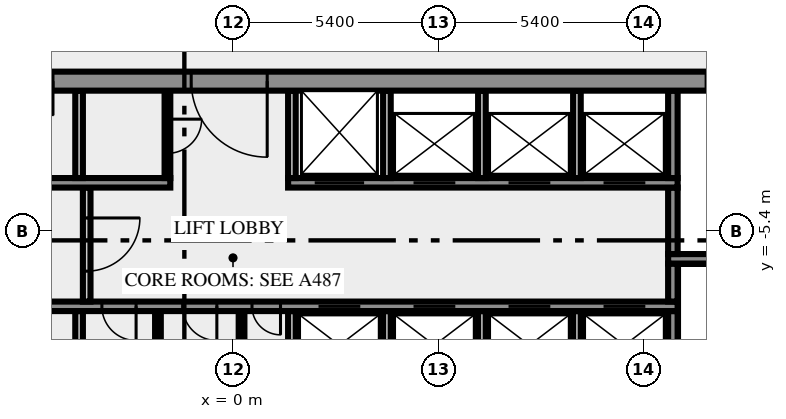
"""IFC4 building model, lengths in metres.
Left out: names, types, materials, properties, quantities, classifications, styles, units other than length and angle.
Written with IfcOpenShell. Run it as: python <this file> out.ifc"""

import sys

from ifc_helpers import new_model, si_unit, direction, frame, frame_2d, origin, place, context, subcontext, project, spatial, rectangle, extrude, element, fill, save


model = new_model("IFC4")
c1 = context("Model", 3, precision=1e-05, world=origin(), true_north=direction((0.0, 1.0)))
c2 = subcontext(c1, "Body", "Model", "MODEL_VIEW")
j1 = project(units=[si_unit("LENGTHUNIT", "METRE"), si_unit("PLANEANGLEUNIT", "RADIAN")], contexts=[c1])
p1 = place(None, origin())
s1 = spatial("IfcSite", under=j1, at=p1, CompositionType="ELEMENT")
p2 = place(p1, origin())
s2 = spatial("IfcBuilding", under=s1, at=p2, CompositionType="ELEMENT")
p3 = place(p2, frame((0.0, 0.0, 180.0)))
s3 = spatial("IfcBuildingStorey", under=s2, at=p3, CompositionType="ELEMENT", Elevation=180.0)
p4 = place(p3, frame((-4.05, -10.5, 0.0), z_axis=(0.0, 0.0, 1.0), x_axis=(0.0, 1.0, 0.0)))
e1 = element("IfcWall", 1, at=p4, inside=s3, PredefinedType="SOLIDWALL", context=c2, shape_type="SweptSolid", body=[
    extrude(rectangle(XDim=3.0, YDim=0.2, at=frame_2d((1.5, 0.0))), origin(), (0.0, 0.0, 1.0), 3.65),
])
for number, where, z_axis, x_axis in (
    (2, (-1.975, -10.5, 0.0), (0.0, 0.0, 1.0), (0.0, 1.0, 0.0)),
    (3, (0.225, -10.5, 0.0), (0.0, 0.0, 1.0), (0.0, 1.0, 0.0)),
):
    element("IfcWall", number, at=place(p3, frame(where, z_axis=z_axis, x_axis=x_axis)), inside=s3, PredefinedType="PARTITIONING", context=c2, shape_type="SweptSolid", body=[
        extrude(rectangle(XDim=3.0, YDim=0.15, at=frame_2d((1.5, 0.0))), origin(), (0.0, 0.0, 1.0), 3.65),
    ])
for number, where, z_axis, x_axis in (
    (4, (1.55, -10.5, 0.0), (0.0, 0.0, 1.0), (0.0, 1.0, 0.0)),
    (5, (4.05, -10.5, 0.0), (0.0, 0.0, 1.0), (0.0, 1.0, 0.0)),
    (6, (6.55, -10.5, 0.0), (0.0, 0.0, 1.0), (0.0, 1.0, 0.0)),
    (7, (9.05, -10.5, 0.0), (0.0, 0.0, 1.0), (0.0, 1.0, 0.0)),
):
    element("IfcWall", number, at=place(p3, frame(where, z_axis=z_axis, x_axis=x_axis)), inside=s3, PredefinedType="SOLIDWALL", context=c2, shape_type="SweptSolid", body=[
        extrude(rectangle(XDim=3.0, YDim=0.2, at=frame_2d((1.5, 0.0))), origin(), (0.0, 0.0, 1.0), 3.65),
    ])
p5 = place(p3, frame((11.575, -10.5, 0.0), z_axis=(0.0, 0.0, 1.0), x_axis=(0.0, 1.0, 0.0)))
e8 = element("IfcWall", 8, at=p5, inside=s3, PredefinedType="SHEAR", context=c2, shape_type="SweptSolid", body=[
    extrude(rectangle(XDim=3.0, YDim=0.25, at=frame_2d((1.5, 0.0))), origin(), (0.0, 0.0, 1.0), 3.65),
])
p6 = place(p3, frame((11.7, -7.375, 0.0), z_axis=(0.0, 0.0, 1.0), x_axis=(-1.0, 0.0, 0.0)))
e9 = element("IfcWall", 9, at=p6, inside=s3, PredefinedType="SHEAR", context=c2, shape_type="SweptSolid", body=[
    extrude(rectangle(XDim=23.4, YDim=0.25, at=frame_2d((11.7, 0.0))), origin(), (0.0, 0.0, 1.0), 3.65),
])
p7 = place(p6, frame((20.613, 0.0, 0.0)))
e10 = element("IfcOpeningElement", 10, at=p7, cuts=e9, PredefinedType="OPENING", context=c2, shape_type="SweptSolid", body=[
    extrude(rectangle(XDim=0.9, YDim=2.1, at=frame_2d((0.45, 1.05))), frame((0.0, 0.135, 0.0), z_axis=(0.0, -1.0, 0.0), x_axis=(1.0, 0.0, 0.0)), (0.0, 0.0, 1.0), 0.27),
])
p8 = place(p6, frame((16.888, 0.0, 0.0)))
e11 = element("IfcOpeningElement", 11, at=p8, cuts=e9, PredefinedType="OPENING", context=c2, shape_type="SweptSolid", body=[
    extrude(rectangle(XDim=0.9, YDim=2.1, at=frame_2d((0.45, 1.05))), frame((0.0, 0.135, 0.0), z_axis=(0.0, -1.0, 0.0), x_axis=(1.0, 0.0, 0.0)), (0.0, 0.0, 1.0), 0.27),
])
p9 = place(p6, frame((14.25, 0.0, 0.0)))
e12 = element("IfcOpeningElement", 12, at=p9, cuts=e9, PredefinedType="OPENING", context=c2, shape_type="SweptSolid", body=[
    extrude(rectangle(XDim=0.9, YDim=2.1, at=frame_2d((0.45, 1.05))), frame((0.0, 0.135, 0.0), z_axis=(0.0, -1.0, 0.0), x_axis=(1.0, 0.0, 0.0)), (0.0, 0.0, 1.0), 0.27),
])
p10 = place(p6, frame((12.125, 0.0, 0.0)))
e13 = element("IfcOpeningElement", 13, at=p10, cuts=e9, PredefinedType="OPENING", context=c2, shape_type="SweptSolid", body=[
    extrude(rectangle(XDim=0.9, YDim=2.1, at=frame_2d((0.45, 1.05))), frame((0.0, 0.135, 0.0), z_axis=(0.0, -1.0, 0.0), x_axis=(1.0, 0.0, 0.0)), (0.0, 0.0, 1.0), 0.27),
])
p11 = place(p6, frame((10.45, 0.0, 0.0)))
e14 = element("IfcOpeningElement", 14, at=p11, cuts=e9, PredefinedType="OPENING", context=c2, shape_type="SweptSolid", body=[
    extrude(rectangle(XDim=0.75, YDim=2.1, at=frame_2d((0.375, 1.05))), frame((0.0, 0.135, 0.0), z_axis=(0.0, -1.0, 0.0), x_axis=(1.0, 0.0, 0.0)), (0.0, 0.0, 1.0), 0.27),
])
p12 = place(p6, frame((8.35, 0.0, 0.0)))
e15 = element("IfcOpeningElement", 15, at=p12, cuts=e9, PredefinedType="OPENING", context=c2, shape_type="SweptSolid", body=[
    extrude(rectangle(XDim=1.1, YDim=2.1, at=frame_2d((0.55, 1.05))), frame((0.0, 0.135, 0.0), z_axis=(0.0, -1.0, 0.0), x_axis=(1.0, 0.0, 0.0)), (0.0, 0.0, 1.0), 0.27),
])
p13 = place(p6, frame((5.85, 0.0, 0.0)))
e16 = element("IfcOpeningElement", 16, at=p13, cuts=e9, PredefinedType="OPENING", context=c2, shape_type="SweptSolid", body=[
    extrude(rectangle(XDim=1.1, YDim=2.1, at=frame_2d((0.55, 1.05))), frame((0.0, 0.135, 0.0), z_axis=(0.0, -1.0, 0.0), x_axis=(1.0, 0.0, 0.0)), (0.0, 0.0, 1.0), 0.27),
])
p14 = place(p6, frame((3.35, 0.0, 0.0)))
e17 = element("IfcOpeningElement", 17, at=p14, cuts=e9, PredefinedType="OPENING", context=c2, shape_type="SweptSolid", body=[
    extrude(rectangle(XDim=1.1, YDim=2.1, at=frame_2d((0.55, 1.05))), frame((0.0, 0.135, 0.0), z_axis=(0.0, -1.0, 0.0), x_axis=(1.0, 0.0, 0.0)), (0.0, 0.0, 1.0), 0.27),
])
p15 = place(p6, frame((0.85, 0.0, 0.0)))
e18 = element("IfcOpeningElement", 18, at=p15, cuts=e9, PredefinedType="OPENING", context=c2, shape_type="SweptSolid", body=[
    extrude(rectangle(XDim=1.1, YDim=2.1, at=frame_2d((0.55, 1.05))), frame((0.0, 0.135, 0.0), z_axis=(0.0, -1.0, 0.0), x_axis=(1.0, 0.0, 0.0)), (0.0, 0.0, 1.0), 0.27),
])
p16 = place(p3, frame((-3.85, -4.25, 0.0), z_axis=(0.0, 0.0, 1.0), x_axis=(0.0, -1.0, 0.0)))
e19 = element("IfcWall", 19, at=p16, inside=s3, PredefinedType="SOLIDWALL", context=c2, shape_type="SweptSolid", body=[
    extrude(rectangle(XDim=3.0, YDim=0.2, at=frame_2d((1.5, 0.0))), origin(), (0.0, 0.0, 1.0), 3.65),
])
p17 = place(p16, frame((0.8, 0.0, 0.0)))
e20 = element("IfcOpeningElement", 20, at=p17, cuts=e19, PredefinedType="OPENING", context=c2, shape_type="SweptSolid", body=[
    extrude(rectangle(XDim=1.4, YDim=2.1, at=frame_2d((0.7, 1.05))), frame((0.0, 0.11, 0.0), z_axis=(0.0, -1.0, 0.0), x_axis=(1.0, 0.0, 0.0)), (0.0, 0.0, 1.0), 0.22),
])
p18 = place(p3, frame((11.575, -7.25, 0.0), z_axis=(0.0, 0.0, 1.0), x_axis=(0.0, 1.0, 0.0)))
e21 = element("IfcWall", 21, at=p18, inside=s3, PredefinedType="SHEAR", context=c2, shape_type="SweptSolid", body=[
    extrude(rectangle(XDim=1.0, YDim=0.25, at=frame_2d((0.5, 0.0))), origin(), (0.0, 0.0, 1.0), 3.65),
])
p19 = place(p3, frame((19.5, -6.125, 0.0), z_axis=(0.0, 0.0, 1.0), x_axis=(-1.0, 0.0, 0.0)))
e22 = element("IfcWall", 22, at=p19, inside=s3, PredefinedType="SHEAR", context=c2, shape_type="SweptSolid", body=[
    extrude(rectangle(XDim=8.05, YDim=0.25, at=frame_2d((4.025, 0.0))), origin(), (0.0, 0.0, 1.0), 3.65),
])
p20 = place(p19, frame((0.05, 0.0, 0.0)))
e23 = element("IfcOpeningElement", 23, at=p20, cuts=e22, PredefinedType="OPENING", context=c2, shape_type="SweptSolid", body=[
    extrude(rectangle(XDim=1.8, YDim=2.1, at=frame_2d((0.9, 1.05))), frame((0.0, 0.135, 0.0), z_axis=(0.0, -1.0, 0.0), x_axis=(1.0, 0.0, 0.0)), (0.0, 0.0, 1.0), 0.27),
])
p21 = place(p3, frame((11.575, -6.0, 0.0), z_axis=(0.0, 0.0, 1.0), x_axis=(0.0, 1.0, 0.0)))
e24 = element("IfcWall", 24, at=p21, inside=s3, PredefinedType="SHEAR", context=c2, shape_type="SweptSolid", body=[
    extrude(rectangle(XDim=1.75, YDim=0.25, at=frame_2d((0.875, 0.0))), origin(), (0.0, 0.0, 1.0), 3.65),
])
p22 = place(p3, frame((-11.7, -4.125, 0.0), z_axis=(0.0, 0.0, 1.0), x_axis=(1.0, 0.0, 0.0)))
e25 = element("IfcWall", 25, at=p22, inside=s3, PredefinedType="SHEAR", context=c2, shape_type="SweptSolid", body=[
    extrude(rectangle(XDim=10.05, YDim=0.25, at=frame_2d((5.025, 0.0))), origin(), (0.0, 0.0, 1.0), 3.65),
])
p23 = place(p3, frame((1.45, -4.125, 0.0), z_axis=(0.0, 0.0, 1.0), x_axis=(1.0, 0.0, 0.0)))
e26 = element("IfcWall", 26, at=p23, inside=s3, PredefinedType="SHEAR", context=c2, shape_type="SweptSolid", body=[
    extrude(rectangle(XDim=10.25, YDim=0.25, at=frame_2d((5.125, 0.0))), origin(), (0.0, 0.0, 1.0), 3.65),
])
p24 = place(p23, frame((0.7, 0.0, 0.0)))
e27 = element("IfcOpeningElement", 27, at=p24, cuts=e26, PredefinedType="OPENING", context=c2, shape_type="SweptSolid", body=[
    extrude(rectangle(XDim=1.3, YDim=2.1, at=frame_2d((0.65, 1.05))), frame((0.0, 0.135, 0.0), z_axis=(0.0, -1.0, 0.0), x_axis=(1.0, 0.0, 0.0)), (0.0, 0.0, 1.0), 0.27),
])
p25 = place(p23, frame((3.3, 0.0, 0.0)))
e28 = element("IfcOpeningElement", 28, at=p25, cuts=e26, PredefinedType="OPENING", context=c2, shape_type="SweptSolid", body=[
    extrude(rectangle(XDim=1.1, YDim=2.1, at=frame_2d((0.55, 1.05))), frame((0.0, 0.135, 0.0), z_axis=(0.0, -1.0, 0.0), x_axis=(1.0, 0.0, 0.0)), (0.0, 0.0, 1.0), 0.27),
])
p26 = place(p23, frame((5.8, 0.0, 0.0)))
e29 = element("IfcOpeningElement", 29, at=p26, cuts=e26, PredefinedType="OPENING", context=c2, shape_type="SweptSolid", body=[
    extrude(rectangle(XDim=1.1, YDim=2.1, at=frame_2d((0.55, 1.05))), frame((0.0, 0.135, 0.0), z_axis=(0.0, -1.0, 0.0), x_axis=(1.0, 0.0, 0.0)), (0.0, 0.0, 1.0), 0.27),
])
p27 = place(p23, frame((8.3, 0.0, 0.0)))
e30 = element("IfcOpeningElement", 30, at=p27, cuts=e26, PredefinedType="OPENING", context=c2, shape_type="SweptSolid", body=[
    extrude(rectangle(XDim=1.1, YDim=2.1, at=frame_2d((0.55, 1.05))), frame((0.0, 0.135, 0.0), z_axis=(0.0, -1.0, 0.0), x_axis=(1.0, 0.0, 0.0)), (0.0, 0.0, 1.0), 0.27),
])
p28 = place(p3, frame((-4.05, -4.0, 0.0), z_axis=(0.0, 0.0, 1.0), x_axis=(0.0, 1.0, 0.0)))
e31 = element("IfcWall", 31, at=p28, inside=s3, PredefinedType="SOLIDWALL", context=c2, shape_type="SweptSolid", body=[
    extrude(rectangle(XDim=2.3, YDim=0.2, at=frame_2d((1.15, 0.0))), origin(), (0.0, 0.0, 1.0), 3.65),
])
p29 = place(p3, frame((-1.725, -1.7, 0.0), z_axis=(0.0, 0.0, 1.0), x_axis=(0.0, -1.0, 0.0)))
e32 = element("IfcWall", 32, at=p29, inside=s3, PredefinedType="PARTITIONING", context=c2, shape_type="SweptSolid", body=[
    extrude(rectangle(XDim=2.3, YDim=0.15, at=frame_2d((1.15, 0.0))), origin(), (0.0, 0.0, 1.0), 3.65),
])
p30 = place(p29, frame((0.75, 0.0, 0.0)))
e33 = element("IfcOpeningElement", 33, at=p30, cuts=e32, PredefinedType="OPENING", context=c2, shape_type="SweptSolid", body=[
    extrude(rectangle(XDim=0.9, YDim=2.1, at=frame_2d((0.45, 1.05))), frame((0.0, 0.085, 0.0), z_axis=(0.0, -1.0, 0.0), x_axis=(1.0, 0.0, 0.0)), (0.0, 0.0, 1.0), 0.17),
])
for number, where, z_axis, x_axis in (
    (34, (1.55, -4.0, 0.0), (0.0, 0.0, 1.0), (0.0, 1.0, 0.0)),
    (35, (4.05, -4.0, 0.0), (0.0, 0.0, 1.0), (0.0, 1.0, 0.0)),
    (36, (6.55, -4.0, 0.0), (0.0, 0.0, 1.0), (0.0, 1.0, 0.0)),
    (37, (9.05, -4.0, 0.0), (0.0, 0.0, 1.0), (0.0, 1.0, 0.0)),
):
    element("IfcWall", number, at=place(p3, frame(where, z_axis=z_axis, x_axis=x_axis)), inside=s3, PredefinedType="SOLIDWALL", context=c2, shape_type="SweptSolid", body=[
        extrude(rectangle(XDim=2.3, YDim=0.2, at=frame_2d((1.15, 0.0))), origin(), (0.0, 0.0, 1.0), 3.65),
    ])
p31 = place(p3, frame((11.575, -4.0, 0.0), z_axis=(0.0, 0.0, 1.0), x_axis=(0.0, 1.0, 0.0)))
e38 = element("IfcWall", 38, at=p31, inside=s3, PredefinedType="SHEAR", context=c2, shape_type="SweptSolid", body=[
    extrude(rectangle(XDim=2.3, YDim=0.25, at=frame_2d((1.15, 0.0))), origin(), (0.0, 0.0, 1.0), 3.65),
])
p32 = place(p3, frame((20.49, -1.45, 0.0), z_axis=(0.0, 0.0, 1.0), x_axis=(-1.0, 0.0, 0.0)))
e39 = element("IfcWall", 39, at=p32, inside=s3, PredefinedType="SHEAR", context=c2, shape_type="SweptSolid", body=[
    extrude(rectangle(XDim=40.98, YDim=0.5, at=frame_2d((20.49, 0.0))), origin(), (0.0, 0.0, 1.0), 3.65),
])
p33 = place(p32, frame((38.14, 0.0, 0.0)))
e40 = element("IfcOpeningElement", 40, at=p33, cuts=e39, PredefinedType="OPENING", context=c2, shape_type="SweptSolid", body=[
    extrude(rectangle(XDim=1.8, YDim=2.1, at=frame_2d((0.9, 1.05))), frame((0.0, 0.26, 0.0), z_axis=(0.0, -1.0, 0.0), x_axis=(1.0, 0.0, 0.0)), (0.0, 0.0, 1.0), 0.52),
])
p34 = place(p32, frame((35.89, 0.0, 0.0)))
e41 = element("IfcOpeningElement", 41, at=p34, cuts=e39, PredefinedType="OPENING", context=c2, shape_type="SweptSolid", body=[
    extrude(rectangle(XDim=0.9, YDim=2.1, at=frame_2d((0.45, 1.05))), frame((0.0, 0.26, 0.0), z_axis=(0.0, -1.0, 0.0), x_axis=(1.0, 0.0, 0.0)), (0.0, 0.0, 1.0), 0.52),
])
p35 = place(p32, frame((32.94, 0.0, 0.0)))
e42 = element("IfcOpeningElement", 42, at=p35, cuts=e39, PredefinedType="OPENING", context=c2, shape_type="SweptSolid", body=[
    extrude(rectangle(XDim=0.9, YDim=2.1, at=frame_2d((0.45, 1.05))), frame((0.0, 0.26, 0.0), z_axis=(0.0, -1.0, 0.0), x_axis=(1.0, 0.0, 0.0)), (0.0, 0.0, 1.0), 0.52),
])
p36 = place(p32, frame((30.802, 0.0, 0.0)))
e43 = element("IfcOpeningElement", 43, at=p36, cuts=e39, PredefinedType="OPENING", context=c2, shape_type="SweptSolid", body=[
    extrude(rectangle(XDim=0.9, YDim=2.1, at=frame_2d((0.45, 1.05))), frame((0.0, 0.26, 0.0), z_axis=(0.0, -1.0, 0.0), x_axis=(1.0, 0.0, 0.0)), (0.0, 0.0, 1.0), 0.52),
])
p37 = place(p32, frame((29.24, 0.0, 0.0)))
e44 = element("IfcOpeningElement", 44, at=p37, cuts=e39, PredefinedType="OPENING", context=c2, shape_type="SweptSolid", body=[
    extrude(rectangle(XDim=0.9, YDim=2.1, at=frame_2d((0.45, 1.05))), frame((0.0, 0.26, 0.0), z_axis=(0.0, -1.0, 0.0), x_axis=(1.0, 0.0, 0.0)), (0.0, 0.0, 1.0), 0.52),
])
p38 = place(p32, frame((27.39, 0.0, 0.0)))
e45 = element("IfcOpeningElement", 45, at=p38, cuts=e39, PredefinedType="OPENING", context=c2, shape_type="SweptSolid", body=[
    extrude(rectangle(XDim=0.9, YDim=2.1, at=frame_2d((0.45, 1.05))), frame((0.0, 0.26, 0.0), z_axis=(0.0, -1.0, 0.0), x_axis=(1.0, 0.0, 0.0)), (0.0, 0.0, 1.0), 0.52),
])
p39 = place(p32, frame((25.228, 0.0, 0.0)))
e46 = element("IfcOpeningElement", 46, at=p39, cuts=e39, PredefinedType="OPENING", context=c2, shape_type="SweptSolid", body=[
    extrude(rectangle(XDim=0.9, YDim=2.1, at=frame_2d((0.45, 1.05))), frame((0.0, 0.26, 0.0), z_axis=(0.0, -1.0, 0.0), x_axis=(1.0, 0.0, 0.0)), (0.0, 0.0, 1.0), 0.52),
])
p40 = place(p32, frame((19.59, 0.0, 0.0)))
e47 = element("IfcOpeningElement", 47, at=p40, cuts=e39, PredefinedType="OPENING", context=c2, shape_type="SweptSolid", body=[
    extrude(rectangle(XDim=2.0, YDim=2.1, at=frame_2d((1.0, 1.05))), frame((0.0, 0.26, 0.0), z_axis=(0.0, -1.0, 0.0), x_axis=(1.0, 0.0, 0.0)), (0.0, 0.0, 1.0), 0.52),
])
p41 = place(p32, frame((7.14, 0.0, 0.0)))
e48 = element("IfcOpeningElement", 48, at=p41, cuts=e39, PredefinedType="OPENING", context=c2, shape_type="SweptSolid", body=[
    extrude(rectangle(XDim=0.9, YDim=2.1, at=frame_2d((0.45, 1.05))), frame((0.0, 0.26, 0.0), z_axis=(0.0, -1.0, 0.0), x_axis=(1.0, 0.0, 0.0)), (0.0, 0.0, 1.0), 0.52),
])
p42 = place(p32, frame((5.028, 0.0, 0.0)))
e49 = element("IfcOpeningElement", 49, at=p42, cuts=e39, PredefinedType="OPENING", context=c2, shape_type="SweptSolid", body=[
    extrude(rectangle(XDim=0.8, YDim=2.1, at=frame_2d((0.4, 1.05))), frame((0.0, 0.26, 0.0), z_axis=(0.0, -1.0, 0.0), x_axis=(1.0, 0.0, 0.0)), (0.0, 0.0, 1.0), 0.52),
])
p43 = place(p32, frame((3.452, 0.0, 0.0)))
e50 = element("IfcOpeningElement", 50, at=p43, cuts=e39, PredefinedType="OPENING", context=c2, shape_type="SweptSolid", body=[
    extrude(rectangle(XDim=0.8, YDim=2.1, at=frame_2d((0.4, 1.05))), frame((0.0, 0.26, 0.0), z_axis=(0.0, -1.0, 0.0), x_axis=(1.0, 0.0, 0.0)), (0.0, 0.0, 1.0), 0.52),
])
p44 = place(p32, frame((1.04, 0.0, 0.0)))
e51 = element("IfcOpeningElement", 51, at=p44, cuts=e39, PredefinedType="OPENING", context=c2, shape_type="SweptSolid", body=[
    extrude(rectangle(XDim=1.8, YDim=2.1, at=frame_2d((0.9, 1.05))), frame((0.0, 0.26, 0.0), z_axis=(0.0, -1.0, 0.0), x_axis=(1.0, 0.0, 0.0)), (0.0, 0.0, 1.0), 0.52),
])
p45 = place(p9, origin())
e52 = element("IfcDoor", 52, at=p45, inside=s3, OperationType="SINGLE_SWING_RIGHT", PredefinedType="DOOR", context=c2, shape_type="SweptSolid", body=[
    extrude(rectangle(XDim=0.9, YDim=2.1, at=frame_2d((0.45, 1.05))), frame((0.0, 0.025, 0.0), z_axis=(0.0, -1.0, 0.0), x_axis=(1.0, 0.0, 0.0)), (0.0, 0.0, 1.0), 0.05),
])
fill(e12, e52)
p46 = place(p10, origin())
e53 = element("IfcDoor", 53, at=p46, inside=s3, OperationType="SINGLE_SWING_RIGHT", PredefinedType="DOOR", context=c2, shape_type="SweptSolid", body=[
    extrude(rectangle(XDim=0.9, YDim=2.1, at=frame_2d((0.45, 1.05))), frame((0.0, 0.025, 0.0), z_axis=(0.0, -1.0, 0.0), x_axis=(1.0, 0.0, 0.0)), (0.0, 0.0, 1.0), 0.05),
])
fill(e13, e53)
p47 = place(p11, origin())
e54 = element("IfcDoor", 54, at=p47, inside=s3, OperationType="SINGLE_SWING_LEFT", PredefinedType="DOOR", context=c2, shape_type="SweptSolid", body=[
    extrude(rectangle(XDim=0.75, YDim=2.1, at=frame_2d((0.375, 1.05))), frame((0.0, 0.025, 0.0), z_axis=(0.0, -1.0, 0.0), x_axis=(1.0, 0.0, 0.0)), (0.0, 0.0, 1.0), 0.05),
])
fill(e14, e54)
p48 = place(p12, origin())
e55 = element("IfcDoor", 55, at=p48, inside=s3, OperationType="DOUBLE_DOOR_SLIDING", PredefinedType="DOOR", context=c2, shape_type="SweptSolid", body=[
    extrude(rectangle(XDim=1.1, YDim=2.1, at=frame_2d((0.55, 1.05))), frame((0.0, 0.025, 0.0), z_axis=(0.0, -1.0, 0.0), x_axis=(1.0, 0.0, 0.0)), (0.0, 0.0, 1.0), 0.05),
])
fill(e15, e55)
p49 = place(p13, origin())
e56 = element("IfcDoor", 56, at=p49, inside=s3, OperationType="DOUBLE_DOOR_SLIDING", PredefinedType="DOOR", context=c2, shape_type="SweptSolid", body=[
    extrude(rectangle(XDim=1.1, YDim=2.1, at=frame_2d((0.55, 1.05))), frame((0.0, 0.025, 0.0), z_axis=(0.0, -1.0, 0.0), x_axis=(1.0, 0.0, 0.0)), (0.0, 0.0, 1.0), 0.05),
])
fill(e16, e56)
p50 = place(p14, origin())
e57 = element("IfcDoor", 57, at=p50, inside=s3, OperationType="DOUBLE_DOOR_SLIDING", PredefinedType="DOOR", context=c2, shape_type="SweptSolid", body=[
    extrude(rectangle(XDim=1.1, YDim=2.1, at=frame_2d((0.55, 1.05))), frame((0.0, 0.025, 0.0), z_axis=(0.0, -1.0, 0.0), x_axis=(1.0, 0.0, 0.0)), (0.0, 0.0, 1.0), 0.05),
])
fill(e17, e57)
p51 = place(p15, origin())
e58 = element("IfcDoor", 58, at=p51, inside=s3, OperationType="DOUBLE_DOOR_SLIDING", PredefinedType="DOOR", context=c2, shape_type="SweptSolid", body=[
    extrude(rectangle(XDim=1.1, YDim=2.1, at=frame_2d((0.55, 1.05))), frame((0.0, 0.025, 0.0), z_axis=(0.0, -1.0, 0.0), x_axis=(1.0, 0.0, 0.0)), (0.0, 0.0, 1.0), 0.05),
])
fill(e18, e58)
p52 = place(p17, origin())
e59 = element("IfcDoor", 59, at=p52, inside=s3, OperationType="DOUBLE_DOOR_SINGLE_SWING", PredefinedType="DOOR", context=c2, shape_type="SweptSolid", body=[
    extrude(rectangle(XDim=1.4, YDim=2.1, at=frame_2d((0.7, 1.05))), frame((0.0, 0.025, 0.0), z_axis=(0.0, -1.0, 0.0), x_axis=(1.0, 0.0, 0.0)), (0.0, 0.0, 1.0), 0.05),
])
fill(e20, e59)
p53 = place(p24, origin())
e60 = element("IfcDoor", 60, at=p53, inside=s3, OperationType="DOUBLE_DOOR_SLIDING", PredefinedType="DOOR", context=c2, shape_type="SweptSolid", body=[
    extrude(rectangle(XDim=1.3, YDim=2.1, at=frame_2d((0.65, 1.05))), frame((0.0, 0.025, 0.0), z_axis=(0.0, -1.0, 0.0), x_axis=(1.0, 0.0, 0.0)), (0.0, 0.0, 1.0), 0.05),
])
fill(e27, e60)
p54 = place(p25, origin())
e61 = element("IfcDoor", 61, at=p54, inside=s3, OperationType="DOUBLE_DOOR_SLIDING", PredefinedType="DOOR", context=c2, shape_type="SweptSolid", body=[
    extrude(rectangle(XDim=1.1, YDim=2.1, at=frame_2d((0.55, 1.05))), frame((0.0, 0.025, 0.0), z_axis=(0.0, -1.0, 0.0), x_axis=(1.0, 0.0, 0.0)), (0.0, 0.0, 1.0), 0.05),
])
fill(e28, e61)
p55 = place(p26, origin())
e62 = element("IfcDoor", 62, at=p55, inside=s3, OperationType="DOUBLE_DOOR_SLIDING", PredefinedType="DOOR", context=c2, shape_type="SweptSolid", body=[
    extrude(rectangle(XDim=1.1, YDim=2.1, at=frame_2d((0.55, 1.05))), frame((0.0, 0.025, 0.0), z_axis=(0.0, -1.0, 0.0), x_axis=(1.0, 0.0, 0.0)), (0.0, 0.0, 1.0), 0.05),
])
fill(e29, e62)
p56 = place(p27, origin())
e63 = element("IfcDoor", 63, at=p56, inside=s3, OperationType="DOUBLE_DOOR_SLIDING", PredefinedType="DOOR", context=c2, shape_type="SweptSolid", body=[
    extrude(rectangle(XDim=1.1, YDim=2.1, at=frame_2d((0.55, 1.05))), frame((0.0, 0.025, 0.0), z_axis=(0.0, -1.0, 0.0), x_axis=(1.0, 0.0, 0.0)), (0.0, 0.0, 1.0), 0.05),
])
fill(e30, e63)
p57 = place(p30, origin())
e64 = element("IfcDoor", 64, at=p57, inside=s3, OperationType="SINGLE_SWING_RIGHT", PredefinedType="DOOR", context=c2, shape_type="SweptSolid", body=[
    extrude(rectangle(XDim=0.9, YDim=2.1, at=frame_2d((0.45, 1.05))), frame((0.0, 0.025, 0.0), z_axis=(0.0, -1.0, 0.0), x_axis=(1.0, 0.0, 0.0)), (0.0, 0.0, 1.0), 0.05),
])
fill(e33, e64)
p58 = place(p39, origin())
e65 = element("IfcDoor", 65, at=p58, inside=s3, OperationType="SINGLE_SWING_RIGHT", PredefinedType="DOOR", context=c2, shape_type="SweptSolid", body=[
    extrude(rectangle(XDim=0.9, YDim=2.1, at=frame_2d((0.45, 1.05))), frame((0.0, 0.025, 0.0), z_axis=(0.0, -1.0, 0.0), x_axis=(1.0, 0.0, 0.0)), (0.0, 0.0, 1.0), 0.05),
])
fill(e46, e65)
p59 = place(p40, origin())
e66 = element("IfcDoor", 66, at=p59, inside=s3, OperationType="DOUBLE_DOOR_SINGLE_SWING", PredefinedType="DOOR", context=c2, shape_type="SweptSolid", body=[
    extrude(rectangle(XDim=2.0, YDim=2.1, at=frame_2d((1.0, 1.05))), frame((0.0, 0.025, 0.0), z_axis=(0.0, -1.0, 0.0), x_axis=(1.0, 0.0, 0.0)), (0.0, 0.0, 1.0), 0.05),
])
fill(e47, e66)
save(model, sys.argv[1])
